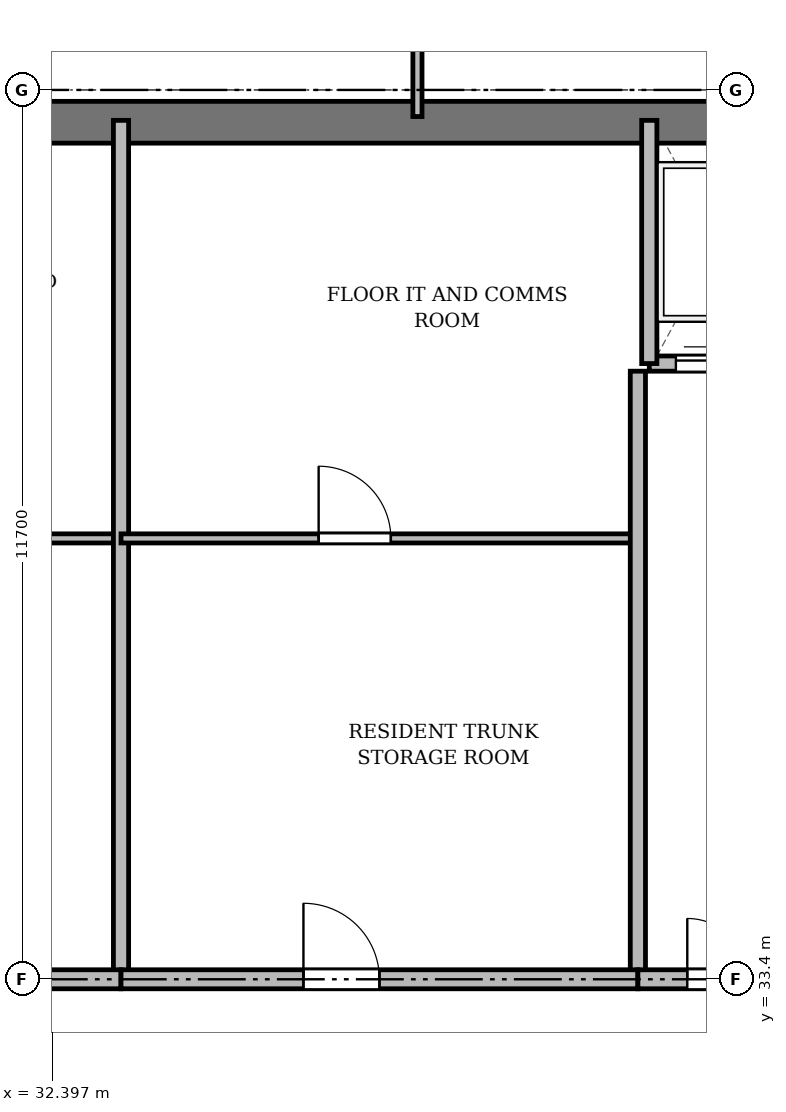
"""IFC4 building model, lengths in metres.
Left out: names, types, materials, properties, quantities, classifications, styles, units other than length and angle.
Written with IfcOpenShell. Run it as: python <this file> out.ifc"""

import sys

from ifc_helpers import new_model, si_unit, direction, frame, frame_2d, origin, place, context, subcontext, project, spatial, rectangle, extrude, source, transform, mapped, element, fill, save


model = new_model("IFC4")
c1 = context("Model", 3, precision=1e-05, world=origin(), true_north=direction((0.0, 1.0)))
c2 = subcontext(c1, "Body", "Model", "MODEL_VIEW")
j1 = project(units=[si_unit("LENGTHUNIT", "METRE"), si_unit("PLANEANGLEUNIT", "RADIAN")], contexts=[c1])
p1 = place(None, origin())
s1 = spatial("IfcSite", under=j1, at=p1, CompositionType="ELEMENT")
p2 = place(p1, origin())
s2 = spatial("IfcBuilding", under=s1, at=p2, CompositionType="ELEMENT")
p3 = place(p2, frame((0.0, 0.0, 248.7)))
s3 = spatial("IfcBuildingStorey", under=s2, at=p3, CompositionType="ELEMENT", Elevation=248.7)
p4 = place(p3, frame((15.65, 44.675, 0.0), z_axis=(0.0, 0.0, 1.0), x_axis=(1.0, 0.0, 0.0)))
e1 = element("IfcWall", 1, at=p4, inside=s3, PredefinedType="SHEAR", context=c2, shape_type="SweptSolid", body=[
    extrude(rectangle(XDim=43.1, YDim=0.55, at=frame_2d((21.55, 0.0))), origin(), (0.0, 0.0, 1.0), 3.37),
])
p5 = place(p3, frame((26.3, 39.2, 0.0), z_axis=(0.0, 0.0, 1.0), x_axis=(1.0, 0.0, 0.0)))
e2 = element("IfcWall", 2, at=p5, inside=s3, PredefinedType="PARTITIONING", context=c2, shape_type="SweptSolid", body=[
    extrude(rectangle(XDim=7.0, YDim=0.12, at=frame_2d((3.5, 0.0))), origin(), (0.0, 0.0, 1.0), 2.87),
])
p6 = place(p5, frame((2.6, 0.0, 0.0)))
e3 = element("IfcOpeningElement", 3, at=p6, cuts=e2, PredefinedType="OPENING", context=c2, shape_type="SweptSolid", body=[
    extrude(rectangle(XDim=0.95, YDim=2.15, at=frame_2d((0.475, 1.075))), frame((0.0, 0.07, 0.0), z_axis=(0.0, -1.0, 0.0), x_axis=(1.0, 0.0, 0.0)), (0.0, 0.0, 1.0), 0.14),
])
p7 = place(p3, frame((33.3, 33.4, 0.0), z_axis=(0.0, 0.0, 1.0), x_axis=(0.0, 1.0, 0.0)))
e4 = element("IfcWall", 4, at=p7, inside=s3, PredefinedType="SOLIDWALL", context=c2, shape_type="SweptSolid", body=[
    extrude(rectangle(XDim=11.3, YDim=0.2, at=frame_2d((5.65, 0.0))), origin(), (0.0, 0.0, 1.0), 2.92),
])
p8 = place(p3, frame((33.3, 39.2, 0.0), z_axis=(0.0, 0.0, 1.0), x_axis=(1.0, 0.0, 0.0)))
e5 = element("IfcWall", 5, at=p8, inside=s3, PredefinedType="PARTITIONING", context=c2, shape_type="SweptSolid", body=[
    extrude(rectangle(XDim=6.8, YDim=0.12, at=frame_2d((3.4, 0.0))), origin(), (0.0, 0.0, 1.0), 3.37),
])
p9 = place(p8, frame((2.6, 0.0, 0.0)))
e6 = element("IfcOpeningElement", 6, at=p9, cuts=e5, PredefinedType="OPENING", context=c2, shape_type="SweptSolid", body=[
    extrude(rectangle(XDim=0.95, YDim=2.15, at=frame_2d((0.475, 1.075))), frame((0.0, 0.07, 0.0), z_axis=(0.0, -1.0, 0.0), x_axis=(1.0, 0.0, 0.0)), (0.0, 0.0, 1.0), 0.14),
])
p10 = place(p3, frame((40.1, 33.4, 0.0), z_axis=(0.0, 0.0, 1.0), x_axis=(0.0, 1.0, 0.0)))
e7 = element("IfcWall", 7, at=p10, inside=s3, PredefinedType="SOLIDWALL", context=c2, shape_type="SweptSolid", body=[
    extrude(rectangle(XDim=8.0, YDim=0.2, at=frame_2d((4.0, 0.0))), origin(), (0.0, 0.0, 1.0), 2.92),
])
p11 = place(p3, frame((40.25, 41.5, 0.0), z_axis=(0.0, 0.0, 1.0), x_axis=(1.0, 0.0, 0.0)))
e8 = element("IfcWall", 8, at=p11, inside=s3, PredefinedType="SOLIDWALL", context=c2, shape_type="SweptSolid", body=[
    extrude(rectangle(XDim=6.9, YDim=0.2, at=frame_2d((3.45, 0.0))), origin(), (0.0, 0.0, 1.0), 3.37),
])
p12 = place(p11, frame((0.35, 0.0, 0.0)))
e9 = element("IfcOpeningElement", 9, at=p12, cuts=e8, PredefinedType="OPENING", context=c2, shape_type="SweptSolid", body=[
    extrude(rectangle(XDim=1.05, YDim=2.15, at=frame_2d((0.525, 1.075))), frame((0.0, 0.11, 0.0), z_axis=(0.0, -1.0, 0.0), x_axis=(1.0, 0.0, 0.0)), (0.0, 0.0, 1.0), 0.22),
])
p13 = place(p11, frame((2.05, 0.0, 0.0)))
e10 = element("IfcOpeningElement", 10, at=p13, cuts=e8, PredefinedType="OPENING", context=c2, shape_type="SweptSolid", body=[
    extrude(rectangle(XDim=1.05, YDim=2.15, at=frame_2d((0.525, 1.075))), frame((0.0, 0.11, 0.0), z_axis=(0.0, -1.0, 0.0), x_axis=(1.0, 0.0, 0.0)), (0.0, 0.0, 1.0), 0.22),
])
p14 = place(p11, frame((3.75, 0.0, 0.0)))
e11 = element("IfcOpeningElement", 11, at=p14, cuts=e8, PredefinedType="OPENING", context=c2, shape_type="SweptSolid", body=[
    extrude(rectangle(XDim=1.05, YDim=2.15, at=frame_2d((0.525, 1.075))), frame((0.0, 0.11, 0.0), z_axis=(0.0, -1.0, 0.0), x_axis=(1.0, 0.0, 0.0)), (0.0, 0.0, 1.0), 0.22),
])
p15 = place(p11, frame((5.45, 0.0, 0.0)))
e12 = element("IfcOpeningElement", 12, at=p15, cuts=e8, PredefinedType="OPENING", context=c2, shape_type="SweptSolid", body=[
    extrude(rectangle(XDim=1.05, YDim=2.15, at=frame_2d((0.525, 1.075))), frame((0.0, 0.11, 0.0), z_axis=(0.0, -1.0, 0.0), x_axis=(1.0, 0.0, 0.0)), (0.0, 0.0, 1.0), 0.22),
])
p16 = place(p3, frame((40.25, 41.5, 0.0), z_axis=(0.0, 0.0, 1.0), x_axis=(0.0, 1.0, 0.0)))
e13 = element("IfcWall", 13, at=p16, inside=s3, PredefinedType="SOLIDWALL", context=c2, shape_type="SweptSolid", body=[
    extrude(rectangle(XDim=3.2, YDim=0.2, at=frame_2d((1.6, 0.0))), origin(), (0.0, 0.0, 1.0), 3.37),
])
p17 = place(p3, frame((26.3, 33.4, 0.0), z_axis=(0.0, 0.0, 1.0), x_axis=(1.0, 0.0, 0.0)))
e14 = element("IfcWall", 14, at=p17, inside=s3, PredefinedType="PARTITIONING", context=c2, shape_type="SweptSolid", body=[
    extrude(rectangle(XDim=7.0, YDim=0.25, at=frame_2d((3.5, 0.0))), origin(), (0.0, 0.0, 1.0), 2.92),
])
p18 = place(p17, frame((1.35, 0.0, 0.0)))
e15 = element("IfcOpeningElement", 15, at=p18, cuts=e14, PredefinedType="OPENING", context=c2, shape_type="SweptSolid", body=[
    extrude(rectangle(XDim=0.95, YDim=2.15, at=frame_2d((0.475, 1.075))), frame((0.0, 0.135, 0.0), z_axis=(0.0, -1.0, 0.0), x_axis=(1.0, 0.0, 0.0)), (0.0, 0.0, 1.0), 0.27),
])
p19 = place(p3, frame((33.3, 33.4, 0.0), z_axis=(0.0, 0.0, 1.0), x_axis=(1.0, 0.0, 0.0)))
e16 = element("IfcWall", 16, at=p19, inside=s3, PredefinedType="PARTITIONING", context=c2, shape_type="SweptSolid", body=[
    extrude(rectangle(XDim=6.8, YDim=0.25, at=frame_2d((3.4, 0.0))), origin(), (0.0, 0.0, 1.0), 2.92),
])
p20 = place(p19, frame((2.4, 0.0, 0.0)))
e17 = element("IfcOpeningElement", 17, at=p20, cuts=e16, PredefinedType="OPENING", context=c2, shape_type="SweptSolid", body=[
    extrude(rectangle(XDim=1.0, YDim=2.15, at=frame_2d((0.5, 1.075))), frame((0.0, 0.135, 0.0), z_axis=(0.0, -1.0, 0.0), x_axis=(1.0, 0.0, 0.0)), (0.0, 0.0, 1.0), 0.27),
])
p21 = place(p3, frame((40.1, 33.4, 0.0), z_axis=(0.0, 0.0, 1.0), x_axis=(1.0, 0.0, 0.0)))
e18 = element("IfcWall", 18, at=p21, inside=s3, PredefinedType="PARTITIONING", context=c2, shape_type="SweptSolid", body=[
    extrude(rectangle(XDim=7.05, YDim=0.25, at=frame_2d((3.525, 0.0))), origin(), (0.0, 0.0, 1.0), 2.92),
])
p22 = place(p21, frame((0.65, 0.0, 0.0)))
e19 = element("IfcOpeningElement", 19, at=p22, cuts=e18, PredefinedType="OPENING", context=c2, shape_type="SweptSolid", body=[
    extrude(rectangle(XDim=1.6, YDim=2.2, at=frame_2d((0.8, 1.1))), frame((0.0, 0.135, 0.0), z_axis=(0.0, -1.0, 0.0), x_axis=(1.0, 0.0, 0.0)), (0.0, 0.0, 1.0), 0.27),
])
p23 = place(p3, frame((37.2, 44.75, 0.0), z_axis=(0.0, 0.0, 1.0), x_axis=(0.0, 1.0, 0.0)))
e20 = element("IfcWall", 20, at=p23, inside=s3, PredefinedType="PARTITIONING", context=c2, shape_type="SweptSolid", body=[
    extrude(rectangle(XDim=3.61, YDim=0.12, at=frame_2d((1.805, 0.0))), origin(), (0.0, 0.0, 1.0), 2.92),
])
p24 = place(p23, frame((1.1, 0.0, 0.0)))
e21 = element("IfcOpeningElement", 21, at=p24, cuts=e20, PredefinedType="OPENING", context=c2, shape_type="SweptSolid", body=[
    extrude(rectangle(XDim=0.95, YDim=2.15, at=frame_2d((0.475, 1.075))), frame((0.0, 0.07, 0.0), z_axis=(0.0, -1.0, 0.0), x_axis=(1.0, 0.0, 0.0)), (0.0, 0.0, 1.0), 0.14),
])
m1 = source(origin(), c2, "Body", "SweptSolid", [
    extrude(rectangle(XDim=0.95, YDim=2.15, at=frame_2d((0.475, 1.075))), frame((0.0, 0.025, 0.0), z_axis=(0.0, -1.0, 0.0), x_axis=(1.0, 0.0, 0.0)), (0.0, 0.0, 1.0), 0.05),
])
p25 = place(p9, origin())
e22 = element("IfcDoor", 22, at=p25, inside=s3, OperationType="SINGLE_SWING_LEFT", PredefinedType="DOOR", context=c2, shape_type="MappedRepresentation", body=[
    mapped(m1, transform((0.0, 0.0, 0.0), x_axis=(1.0, 0.0, 0.0), y_axis=(0.0, 1.0, 0.0), z_axis=(0.0, 0.0, 1.0), scale=1.0)),
])
fill(e6, e22)
m2 = source(origin(), c2, "Body", "SweptSolid", [
    extrude(rectangle(XDim=1.05, YDim=2.15, at=frame_2d((0.525, 1.075))), frame((0.0, 0.025, 0.0), z_axis=(0.0, -1.0, 0.0), x_axis=(1.0, 0.0, 0.0)), (0.0, 0.0, 1.0), 0.05),
])
p26 = place(p12, origin())
e23 = element("IfcDoor", 23, at=p26, inside=s3, OperationType="DOUBLE_DOOR_SLIDING", PredefinedType="DOOR", context=c2, shape_type="MappedRepresentation", body=[
    mapped(m2, transform((0.0, 0.0, 0.0), x_axis=(1.0, 0.0, 0.0), y_axis=(0.0, 1.0, 0.0), z_axis=(0.0, 0.0, 1.0), scale=1.0)),
])
fill(e9, e23)
m3 = source(origin(), c2, "Body", "SweptSolid", [
    extrude(rectangle(XDim=1.0, YDim=2.15, at=frame_2d((0.5, 1.075))), frame((0.0, 0.025, 0.0), z_axis=(0.0, -1.0, 0.0), x_axis=(1.0, 0.0, 0.0)), (0.0, 0.0, 1.0), 0.05),
])
p27 = place(p20, origin())
e24 = element("IfcDoor", 24, at=p27, inside=s3, OperationType="SINGLE_SWING_LEFT", PredefinedType="DOOR", context=c2, shape_type="MappedRepresentation", body=[
    mapped(m3, transform((0.0, 0.0, 0.0), x_axis=(1.0, 0.0, 0.0), y_axis=(0.0, 1.0, 0.0), z_axis=(0.0, 0.0, 1.0), scale=1.0)),
])
fill(e17, e24)
m4 = source(origin(), c2, "Body", "SweptSolid", [
    extrude(rectangle(XDim=1.6, YDim=2.2, at=frame_2d((0.8, 1.1))), frame((0.0, 0.025, 0.0), z_axis=(0.0, -1.0, 0.0), x_axis=(1.0, 0.0, 0.0)), (0.0, 0.0, 1.0), 0.05),
])
p28 = place(p22, origin())
e25 = element("IfcDoor", 25, at=p28, inside=s3, OperationType="DOUBLE_DOOR_SINGLE_SWING", PredefinedType="DOOR", context=c2, shape_type="MappedRepresentation", body=[
    mapped(m4, transform((0.0, 0.0, 0.0), x_axis=(1.0, 0.0, 0.0), y_axis=(0.0, 1.0, 0.0), z_axis=(0.0, 0.0, 1.0), scale=1.0)),
])
fill(e19, e25)
save(model, sys.argv[1])
